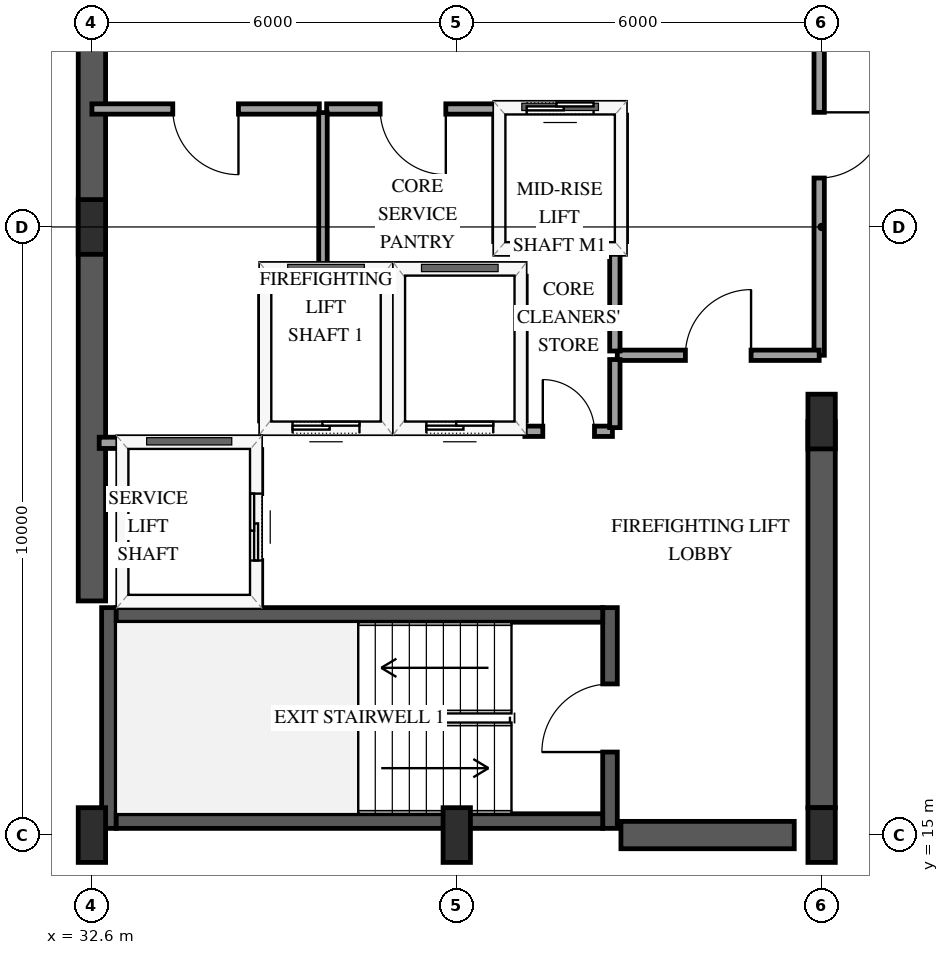
"""IFC4 building model, lengths in metres.
Left out: names, types, materials, properties, quantities, classifications, styles, units other than length and angle.
Written with IfcOpenShell. Run it as: python <this file> out.ifc"""

import sys

from ifc_helpers import new_model, si_unit, direction, frame, frame_2d, origin, origin_2d, place, context, subcontext, project, spatial, rectangle, extrude, element, fill, save


model = new_model("IFC4")
c1 = context("Model", 3, precision=1e-05, world=origin(), true_north=direction((0.0, 1.0)))
c2 = subcontext(c1, "Body", "Model", "MODEL_VIEW")
j1 = project(units=[si_unit("LENGTHUNIT", "METRE"), si_unit("PLANEANGLEUNIT", "RADIAN")], contexts=[c1])
p1 = place(None, origin())
s1 = spatial("IfcSite", under=j1, at=p1, CompositionType="ELEMENT")
p2 = place(p1, origin())
s2 = spatial("IfcBuilding", under=s1, at=p2, CompositionType="ELEMENT")
p3 = place(p2, frame((0.0, 0.0, 197.8)))
s3 = spatial("IfcBuildingStorey", under=s2, at=p3, CompositionType="ELEMENT", Elevation=197.8)
p4 = place(p3, frame((32.88, 15.11, 0.0), z_axis=(0.0, 0.0, 1.0), x_axis=(0.0, 1.0, 0.0)))
e1 = element("IfcWall", 1, at=p4, inside=s3, PredefinedType="SHEAR", context=c2, shape_type="SweptSolid", body=[
    extrude(rectangle(XDim=3.63, YDim=0.24, at=frame_2d((1.815, 0.0))), origin(), (0.0, 0.0, 1.0), 3.6),
])
p5 = place(p3, frame((41.12, 15.11, 0.0), z_axis=(0.0, 0.0, 1.0), x_axis=(0.0, 1.0, 0.0)))
e2 = element("IfcWall", 2, at=p5, inside=s3, PredefinedType="SHEAR", context=c2, shape_type="SweptSolid", body=[
    extrude(rectangle(XDim=3.63, YDim=0.24, at=frame_2d((1.815, 0.0))), origin(), (0.0, 0.0, 1.0), 3.6),
])
p6 = place(p5, frame((1.255, 0.0, 0.0)))
e3 = element("IfcOpeningElement", 3, at=p6, cuts=e2, PredefinedType="OPENING", context=c2, shape_type="SweptSolid", body=[
    extrude(rectangle(XDim=1.12, YDim=2.15, at=frame_2d((0.56, 1.075))), frame((0.0, 0.13, 0.0), z_axis=(0.0, -1.0, 0.0), x_axis=(1.0, 0.0, 0.0)), (0.0, 0.0, 1.0), 0.26),
])
for number, where, z_axis, x_axis in (
    (4, (33.0, 15.23, 0.0), (0.0, 0.0, 1.0), (1.0, 0.0, 0.0)),
    (5, (33.0, 18.62, 0.0), (0.0, 0.0, 1.0), (1.0, 0.0, 0.0)),
):
    element("IfcWall", number, at=place(p3, frame(where, z_axis=z_axis, x_axis=x_axis)), inside=s3, PredefinedType="SHEAR", context=c2, shape_type="SweptSolid", body=[
        extrude(rectangle(XDim=8.0, YDim=0.24, at=frame_2d((4.0, 0.0))), origin(), (0.0, 0.0, 1.0), 3.6),
    ])
p7 = place(p3, frame((32.6, 18.85, 0.0), z_axis=(0.0, 0.0, 1.0), x_axis=(0.0, 1.0, 0.0)))
e6 = element("IfcWall", 6, at=p7, inside=s3, PredefinedType="SHEAR", context=c2, shape_type="SweptSolid", body=[
    extrude(rectangle(XDim=12.3, YDim=0.45, at=frame_2d((6.15, 0.0))), origin(), (0.0, 0.0, 1.0), 3.6),
])
p8 = place(p3, frame((41.3, 15.0, 0.0), z_axis=(0.0, 0.0, 1.0), x_axis=(1.0, 0.0, 0.0)))
e7 = element("IfcWall", 7, at=p8, inside=s3, PredefinedType="SHEAR", context=c2, shape_type="SweptSolid", body=[
    extrude(rectangle(XDim=2.85, YDim=0.45, at=frame_2d((1.425, 0.0))), origin(), (0.0, 0.0, 1.0), 3.6),
])
p9 = place(p3, frame((44.6, 15.45, 0.0), z_axis=(0.0, 0.0, 1.0), x_axis=(0.0, 1.0, 0.0)))
e8 = element("IfcWall", 8, at=p9, inside=s3, PredefinedType="SHEAR", context=c2, shape_type="SweptSolid", body=[
    extrude(rectangle(XDim=6.35, YDim=0.45, at=frame_2d((3.175, 0.0))), origin(), (0.0, 0.0, 1.0), 3.6),
])
for number, where, z_axis, x_axis in (
    (9, (32.6, 15.0, 0.0), (0.0, 0.0, 1.0), (1.0, 0.0, 0.0)),
    (10, (32.6, 25.0, 0.0), (0.0, 0.0, 1.0), (1.0, 0.0, 0.0)),
    (11, (38.6, 15.0, 0.0), (0.0, 0.0, 1.0), (1.0, 0.0, 0.0)),
    (12, (44.6, 15.0, 0.0), (0.0, 0.0, 1.0), (1.0, 0.0, 0.0)),
    (13, (44.6, 21.8, 0.0), (0.0, 0.0, 1.0), (1.0, 0.0, 0.0)),
):
    element("IfcColumn", number, at=place(p3, frame(where, z_axis=z_axis, x_axis=x_axis)), inside=s3, PredefinedType="PILASTER", context=c2, shape_type="SweptSolid", body=[
        extrude(rectangle(XDim=0.45, YDim=0.9, at=origin_2d()), origin(), (0.0, 0.0, 1.0), 3.6),
    ])
p10 = place(p3, frame((35.45, 21.7, 0.0), z_axis=(0.0, 0.0, 1.0), x_axis=(1.0, 0.0, 0.0)))
e14 = element("IfcWall", 14, at=p10, inside=s3, PredefinedType="SOLIDWALL", context=c2, shape_type="SweptSolid", body=[
    extrude(rectangle(XDim=2.0, YDim=0.185, at=frame_2d((1.0, 0.0))), origin(), (0.0, 0.0, 1.0), 3.3),
])
p11 = place(p10, frame((0.45, 0.0, 0.0)))
e15 = element("IfcOpeningElement", 15, at=p11, cuts=e14, PredefinedType="OPENING", context=c2, shape_type="SweptSolid", body=[
    extrude(rectangle(XDim=1.1, YDim=2.15, at=frame_2d((0.55, 1.075))), frame((0.0, 0.103, 0.0), z_axis=(0.0, -1.0, 0.0), x_axis=(1.0, 0.0, 0.0)), (0.0, 0.0, 1.0), 0.205),
])
p12 = place(p3, frame((35.45, 24.3, 0.0), z_axis=(0.0, 0.0, 1.0), x_axis=(1.0, 0.0, 0.0)))
e16 = element("IfcWall", 16, at=p12, inside=s3, PredefinedType="SOLIDWALL", context=c2, shape_type="SweptSolid", body=[
    extrude(rectangle(XDim=2.0, YDim=0.185, at=frame_2d((1.0, 0.0))), origin(), (0.0, 0.0, 1.0), 3.3),
])
for number, where, z_axis, x_axis in (
    (17, (35.45, 21.81, 0.0), (0.0, 0.0, 1.0), (0.0, 1.0, 0.0)),
    (18, (37.45, 21.81, 0.0), (0.0, 0.0, 1.0), (0.0, 1.0, 0.0)),
):
    element("IfcWall", number, at=place(p3, frame(where, z_axis=z_axis, x_axis=x_axis)), inside=s3, PredefinedType="SOLIDWALL", context=c2, shape_type="SweptSolid", body=[
        extrude(rectangle(XDim=2.38, YDim=0.185, at=frame_2d((1.19, 0.0))), origin(), (0.0, 0.0, 1.0), 3.3),
    ])
p13 = place(p3, frame((37.65, 21.7, 0.0), z_axis=(0.0, 0.0, 1.0), x_axis=(1.0, 0.0, 0.0)))
e19 = element("IfcWall", 19, at=p13, inside=s3, PredefinedType="SOLIDWALL", context=c2, shape_type="SweptSolid", body=[
    extrude(rectangle(XDim=2.0, YDim=0.185, at=frame_2d((1.0, 0.0))), origin(), (0.0, 0.0, 1.0), 3.3),
])
p14 = place(p13, frame((0.45, 0.0, 0.0)))
e20 = element("IfcOpeningElement", 20, at=p14, cuts=e19, PredefinedType="OPENING", context=c2, shape_type="SweptSolid", body=[
    extrude(rectangle(XDim=1.1, YDim=2.15, at=frame_2d((0.55, 1.075))), frame((0.0, 0.103, 0.0), z_axis=(0.0, -1.0, 0.0), x_axis=(1.0, 0.0, 0.0)), (0.0, 0.0, 1.0), 0.205),
])
p15 = place(p3, frame((37.65, 24.3, 0.0), z_axis=(0.0, 0.0, 1.0), x_axis=(1.0, 0.0, 0.0)))
e21 = element("IfcWall", 21, at=p15, inside=s3, PredefinedType="SOLIDWALL", context=c2, shape_type="SweptSolid", body=[
    extrude(rectangle(XDim=2.0, YDim=0.185, at=frame_2d((1.0, 0.0))), origin(), (0.0, 0.0, 1.0), 3.3),
])
p16 = place(p3, frame((39.65, 21.81, 0.0), z_axis=(0.0, 0.0, 1.0), x_axis=(0.0, 1.0, 0.0)))
e22 = element("IfcWall", 22, at=p16, inside=s3, PredefinedType="SOLIDWALL", context=c2, shape_type="SweptSolid", body=[
    extrude(rectangle(XDim=2.38, YDim=0.185, at=frame_2d((1.19, 0.0))), origin(), (0.0, 0.0, 1.0), 3.3),
])
p17 = place(p3, frame((32.72, 21.45, 0.0), z_axis=(0.0, 0.0, 1.0), x_axis=(1.0, 0.0, 0.0)))
e23 = element("IfcWall", 23, at=p17, inside=s3, PredefinedType="SOLIDWALL", context=c2, shape_type="SweptSolid", body=[
    extrude(rectangle(XDim=2.58, YDim=0.185, at=frame_2d((1.29, 0.0))), origin(), (0.0, 0.0, 1.0), 3.3),
])
p18 = place(p3, frame((35.3, 18.79, 0.0), z_axis=(0.0, 0.0, 1.0), x_axis=(0.0, 1.0, 0.0)))
e24 = element("IfcWall", 24, at=p18, inside=s3, PredefinedType="SOLIDWALL", context=c2, shape_type="SweptSolid", body=[
    extrude(rectangle(XDim=2.55, YDim=0.185, at=frame_2d((1.275, 0.0))), origin(), (0.0, 0.0, 1.0), 3.3),
])
p19 = place(p18, frame((0.725, 0.0, 0.0)))
e25 = element("IfcOpeningElement", 25, at=p19, cuts=e24, PredefinedType="OPENING", context=c2, shape_type="SweptSolid", body=[
    extrude(rectangle(XDim=1.1, YDim=2.15, at=frame_2d((0.55, 1.075))), frame((0.0, 0.103, 0.0), z_axis=(0.0, -1.0, 0.0), x_axis=(1.0, 0.0, 0.0)), (0.0, 0.0, 1.0), 0.205),
])
p20 = place(p3, frame((39.3, 24.65, 0.0), z_axis=(0.0, 0.0, 1.0), x_axis=(1.0, 0.0, 0.0)))
e26 = element("IfcWall", 26, at=p20, inside=s3, PredefinedType="SOLIDWALL", context=c2, shape_type="SweptSolid", body=[
    extrude(rectangle(XDim=2.0, YDim=0.185, at=frame_2d((1.0, 0.0))), origin(), (0.0, 0.0, 1.0), 3.3),
])
p21 = place(p3, frame((39.3, 26.95, 0.0), z_axis=(0.0, 0.0, 1.0), x_axis=(1.0, 0.0, 0.0)))
e27 = element("IfcWall", 27, at=p21, inside=s3, PredefinedType="SOLIDWALL", context=c2, shape_type="SweptSolid", body=[
    extrude(rectangle(XDim=2.0, YDim=0.185, at=frame_2d((1.0, 0.0))), origin(), (0.0, 0.0, 1.0), 3.3),
])
p22 = place(p21, frame((0.45, 0.0, 0.0)))
e28 = element("IfcOpeningElement", 28, at=p22, cuts=e27, PredefinedType="OPENING", context=c2, shape_type="SweptSolid", body=[
    extrude(rectangle(XDim=1.1, YDim=2.15, at=frame_2d((0.55, 1.075))), frame((0.0, 0.103, 0.0), z_axis=(0.0, -1.0, 0.0), x_axis=(1.0, 0.0, 0.0)), (0.0, 0.0, 1.0), 0.205),
])
for number, where, z_axis, x_axis in (
    (29, (39.3, 24.76, 0.0), (0.0, 0.0, 1.0), (0.0, 1.0, 0.0)),
    (30, (41.3, 24.76, 0.0), (0.0, 0.0, 1.0), (0.0, 1.0, 0.0)),
):
    element("IfcWall", number, at=place(p3, frame(where, z_axis=z_axis, x_axis=x_axis)), inside=s3, PredefinedType="SOLIDWALL", context=c2, shape_type="SweptSolid", body=[
        extrude(rectangle(XDim=2.08, YDim=0.185, at=frame_2d((1.04, 0.0))), origin(), (0.0, 0.0, 1.0), 3.3),
    ])
p23 = place(p3, frame((44.56, 29.8, 0.0), z_axis=(0.0, 0.0, 1.0), x_axis=(0.0, -1.0, 0.0)))
e31 = element("IfcWall", 31, at=p23, inside=s3, PredefinedType="PARTITIONING", context=c2, shape_type="SweptSolid", body=[
    extrude(rectangle(XDim=6.91, YDim=0.17, at=frame_2d((3.455, 0.0))), origin(), (0.0, 0.0, 1.0), 2.34),
])
p24 = place(p23, frame((2.915, 0.0, 0.0)))
e32 = element("IfcOpeningElement", 32, at=p24, cuts=e31, PredefinedType="OPENING", context=c2, shape_type="SweptSolid", body=[
    extrude(rectangle(XDim=1.08, YDim=2.15, at=frame_2d((0.54, 1.075))), frame((0.0, 0.095, 0.0), z_axis=(0.0, -1.0, 0.0), x_axis=(1.0, 0.0, 0.0)), (0.0, 0.0, 1.0), 0.19),
])
p25 = place(p3, frame((36.34, 26.94, 0.0), z_axis=(0.0, 0.0, 1.0), x_axis=(-1.0, 0.0, 0.0)))
e33 = element("IfcWall", 33, at=p25, inside=s3, PredefinedType="PARTITIONING", context=c2, shape_type="SweptSolid", body=[
    extrude(rectangle(XDim=3.74, YDim=0.17, at=frame_2d((1.87, 0.0))), origin(), (0.0, 0.0, 1.0), 3.3),
])
p26 = place(p25, frame((1.33, 0.0, 0.0)))
e34 = element("IfcOpeningElement", 34, at=p26, cuts=e33, PredefinedType="OPENING", context=c2, shape_type="SweptSolid", body=[
    extrude(rectangle(XDim=1.08, YDim=2.15, at=frame_2d((0.54, 1.075))), frame((0.0, 0.095, 0.0), z_axis=(0.0, -1.0, 0.0), x_axis=(1.0, 0.0, 0.0)), (0.0, 0.0, 1.0), 0.19),
])
p27 = place(p3, frame((41.24, 22.89, 0.0), z_axis=(0.0, 0.0, 1.0), x_axis=(1.0, 0.0, 0.0)))
e35 = element("IfcWall", 35, at=p27, inside=s3, PredefinedType="PARTITIONING", context=c2, shape_type="SweptSolid", body=[
    extrude(rectangle(XDim=3.32, YDim=0.17, at=frame_2d((1.66, 0.0))), origin(), (0.0, 0.0, 1.0), 3.3),
])
p28 = place(p27, frame((1.12, 0.0, 0.0)))
e36 = element("IfcOpeningElement", 36, at=p28, cuts=e35, PredefinedType="OPENING", context=c2, shape_type="SweptSolid", body=[
    extrude(rectangle(XDim=1.08, YDim=2.15, at=frame_2d((0.54, 1.075))), frame((0.0, 0.095, 0.0), z_axis=(0.0, -1.0, 0.0), x_axis=(1.0, 0.0, 0.0)), (0.0, 0.0, 1.0), 0.19),
])
p29 = place(p3, frame((39.3, 26.94, 0.0), z_axis=(0.0, 0.0, 1.0), x_axis=(-1.0, 0.0, 0.0)))
e37 = element("IfcWall", 37, at=p29, inside=s3, PredefinedType="PARTITIONING", context=c2, shape_type="SweptSolid", body=[
    extrude(rectangle(XDim=2.84, YDim=0.17, at=frame_2d((1.42, 0.0))), origin(), (0.0, 0.0, 1.0), 3.3),
])
p30 = place(p29, frame((0.88, 0.0, 0.0)))
e38 = element("IfcOpeningElement", 38, at=p30, cuts=e37, PredefinedType="OPENING", context=c2, shape_type="SweptSolid", body=[
    extrude(rectangle(XDim=1.08, YDim=2.15, at=frame_2d((0.54, 1.075))), frame((0.0, 0.095, 0.0), z_axis=(0.0, -1.0, 0.0), x_axis=(1.0, 0.0, 0.0)), (0.0, 0.0, 1.0), 0.19),
])
p31 = place(p3, frame((36.4, 26.88, 0.0), z_axis=(0.0, 0.0, 1.0), x_axis=(0.0, -1.0, 0.0)))
e39 = element("IfcWall", 39, at=p31, inside=s3, PredefinedType="PARTITIONING", context=c2, shape_type="SweptSolid", body=[
    extrude(rectangle(XDim=2.58, YDim=0.14, at=frame_2d((1.29, 0.0))), origin(), (0.0, 0.0, 1.0), 3.3),
])
p32 = place(p3, frame((41.2, 22.96, 0.0), z_axis=(0.0, 0.0, 1.0), x_axis=(0.0, 1.0, 0.0)))
e40 = element("IfcWall", 40, at=p32, inside=s3, PredefinedType="PARTITIONING", context=c2, shape_type="SweptSolid", body=[
    extrude(rectangle(XDim=1.69, YDim=0.17, at=frame_2d((0.845, 0.0))), origin(), (0.0, 0.0, 1.0), 3.3),
])
p33 = place(p3, frame((39.72, 21.64, 0.0), z_axis=(0.0, 0.0, 1.0), x_axis=(1.0, 0.0, 0.0)))
e41 = element("IfcWall", 41, at=p33, inside=s3, PredefinedType="PARTITIONING", context=c2, shape_type="SweptSolid", body=[
    extrude(rectangle(XDim=1.44, YDim=0.17, at=frame_2d((0.72, 0.0))), origin(), (0.0, 0.0, 1.0), 3.3),
])
p34 = place(p33, frame((0.295, 0.0, 0.0)))
e42 = element("IfcOpeningElement", 42, at=p34, cuts=e41, PredefinedType="OPENING", context=c2, shape_type="SweptSolid", body=[
    extrude(rectangle(XDim=0.85, YDim=2.1, at=frame_2d((0.425, 1.05))), frame((0.0, 0.095, 0.0), z_axis=(0.0, -1.0, 0.0), x_axis=(1.0, 0.0, 0.0)), (0.0, 0.0, 1.0), 0.19),
])
p35 = place(p3, frame((41.2, 21.7, 0.0), z_axis=(0.0, 0.0, 1.0), x_axis=(0.0, 1.0, 0.0)))
e43 = element("IfcWall", 43, at=p35, inside=s3, PredefinedType="PARTITIONING", context=c2, shape_type="SweptSolid", body=[
    extrude(rectangle(XDim=1.12, YDim=0.17, at=frame_2d((0.56, 0.0))), origin(), (0.0, 0.0, 1.0), 3.3),
])
p36 = place(p11, origin())
e44 = element("IfcDoor", 44, at=p36, inside=s3, OperationType="SLIDING_TO_LEFT", PredefinedType="DOOR", context=c2, shape_type="SweptSolid", body=[
    extrude(rectangle(XDim=1.1, YDim=2.15, at=frame_2d((0.55, 1.075))), frame((0.0, 0.025, 0.0), z_axis=(0.0, -1.0, 0.0), x_axis=(1.0, 0.0, 0.0)), (0.0, 0.0, 1.0), 0.05),
])
fill(e15, e44)
p37 = place(p14, origin())
e45 = element("IfcDoor", 45, at=p37, inside=s3, OperationType="SLIDING_TO_LEFT", PredefinedType="DOOR", context=c2, shape_type="SweptSolid", body=[
    extrude(rectangle(XDim=1.1, YDim=2.15, at=frame_2d((0.55, 1.075))), frame((0.0, 0.025, 0.0), z_axis=(0.0, -1.0, 0.0), x_axis=(1.0, 0.0, 0.0)), (0.0, 0.0, 1.0), 0.05),
])
fill(e20, e45)
p38 = place(p19, origin())
e46 = element("IfcDoor", 46, at=p38, inside=s3, OperationType="SLIDING_TO_LEFT", PredefinedType="DOOR", context=c2, shape_type="SweptSolid", body=[
    extrude(rectangle(XDim=1.1, YDim=2.15, at=frame_2d((0.55, 1.075))), frame((0.0, 0.025, 0.0), z_axis=(0.0, -1.0, 0.0), x_axis=(1.0, 0.0, 0.0)), (0.0, 0.0, 1.0), 0.05),
])
fill(e25, e46)
p39 = place(p22, origin())
e47 = element("IfcDoor", 47, at=p39, inside=s3, OperationType="SLIDING_TO_LEFT", PredefinedType="DOOR", context=c2, shape_type="SweptSolid", body=[
    extrude(rectangle(XDim=1.1, YDim=2.15, at=frame_2d((0.55, 1.075))), frame((0.0, 0.025, 0.0), z_axis=(0.0, -1.0, 0.0), x_axis=(1.0, 0.0, 0.0)), (0.0, 0.0, 1.0), 0.05),
])
fill(e28, e47)
p40 = place(p6, origin())
e48 = element("IfcDoor", 48, at=p40, inside=s3, OperationType="SINGLE_SWING_LEFT", PredefinedType="DOOR", context=c2, shape_type="SweptSolid", body=[
    extrude(rectangle(XDim=1.12, YDim=2.15, at=frame_2d((0.56, 1.075))), frame((0.0, 0.025, 0.0), z_axis=(0.0, -1.0, 0.0), x_axis=(1.0, 0.0, 0.0)), (0.0, 0.0, 1.0), 0.05),
])
fill(e3, e48)
p41 = place(p24, origin())
e49 = element("IfcDoor", 49, at=p41, inside=s3, OperationType="SINGLE_SWING_LEFT", PredefinedType="DOOR", context=c2, shape_type="SweptSolid", body=[
    extrude(rectangle(XDim=1.08, YDim=2.15, at=frame_2d((0.54, 1.075))), frame((0.0, 0.025, 0.0), z_axis=(0.0, -1.0, 0.0), x_axis=(1.0, 0.0, 0.0)), (0.0, 0.0, 1.0), 0.05),
])
fill(e32, e49)
p42 = place(p26, origin())
e50 = element("IfcDoor", 50, at=p42, inside=s3, OperationType="SINGLE_SWING_LEFT", PredefinedType="DOOR", context=c2, shape_type="SweptSolid", body=[
    extrude(rectangle(XDim=1.08, YDim=2.15, at=frame_2d((0.54, 1.075))), frame((0.0, 0.025, 0.0), z_axis=(0.0, -1.0, 0.0), x_axis=(1.0, 0.0, 0.0)), (0.0, 0.0, 1.0), 0.05),
])
fill(e34, e50)
p43 = place(p28, origin())
e51 = element("IfcDoor", 51, at=p43, inside=s3, OperationType="SINGLE_SWING_RIGHT", PredefinedType="DOOR", context=c2, shape_type="SweptSolid", body=[
    extrude(rectangle(XDim=1.08, YDim=2.15, at=frame_2d((0.54, 1.075))), frame((0.0, 0.025, 0.0), z_axis=(0.0, -1.0, 0.0), x_axis=(1.0, 0.0, 0.0)), (0.0, 0.0, 1.0), 0.05),
])
fill(e36, e51)
p44 = place(p30, origin())
e52 = element("IfcDoor", 52, at=p44, inside=s3, OperationType="SINGLE_SWING_LEFT", PredefinedType="DOOR", context=c2, shape_type="SweptSolid", body=[
    extrude(rectangle(XDim=1.08, YDim=2.15, at=frame_2d((0.54, 1.075))), frame((0.0, 0.025, 0.0), z_axis=(0.0, -1.0, 0.0), x_axis=(1.0, 0.0, 0.0)), (0.0, 0.0, 1.0), 0.05),
])
fill(e38, e52)
p45 = place(p34, origin())
e53 = element("IfcDoor", 53, at=p45, inside=s3, OperationType="SINGLE_SWING_LEFT", PredefinedType="DOOR", context=c2, shape_type="SweptSolid", body=[
    extrude(rectangle(XDim=0.85, YDim=2.1, at=frame_2d((0.425, 1.05))), frame((0.0, 0.025, 0.0), z_axis=(0.0, -1.0, 0.0), x_axis=(1.0, 0.0, 0.0)), (0.0, 0.0, 1.0), 0.05),
])
fill(e42, e53)
save(model, sys.argv[1])
